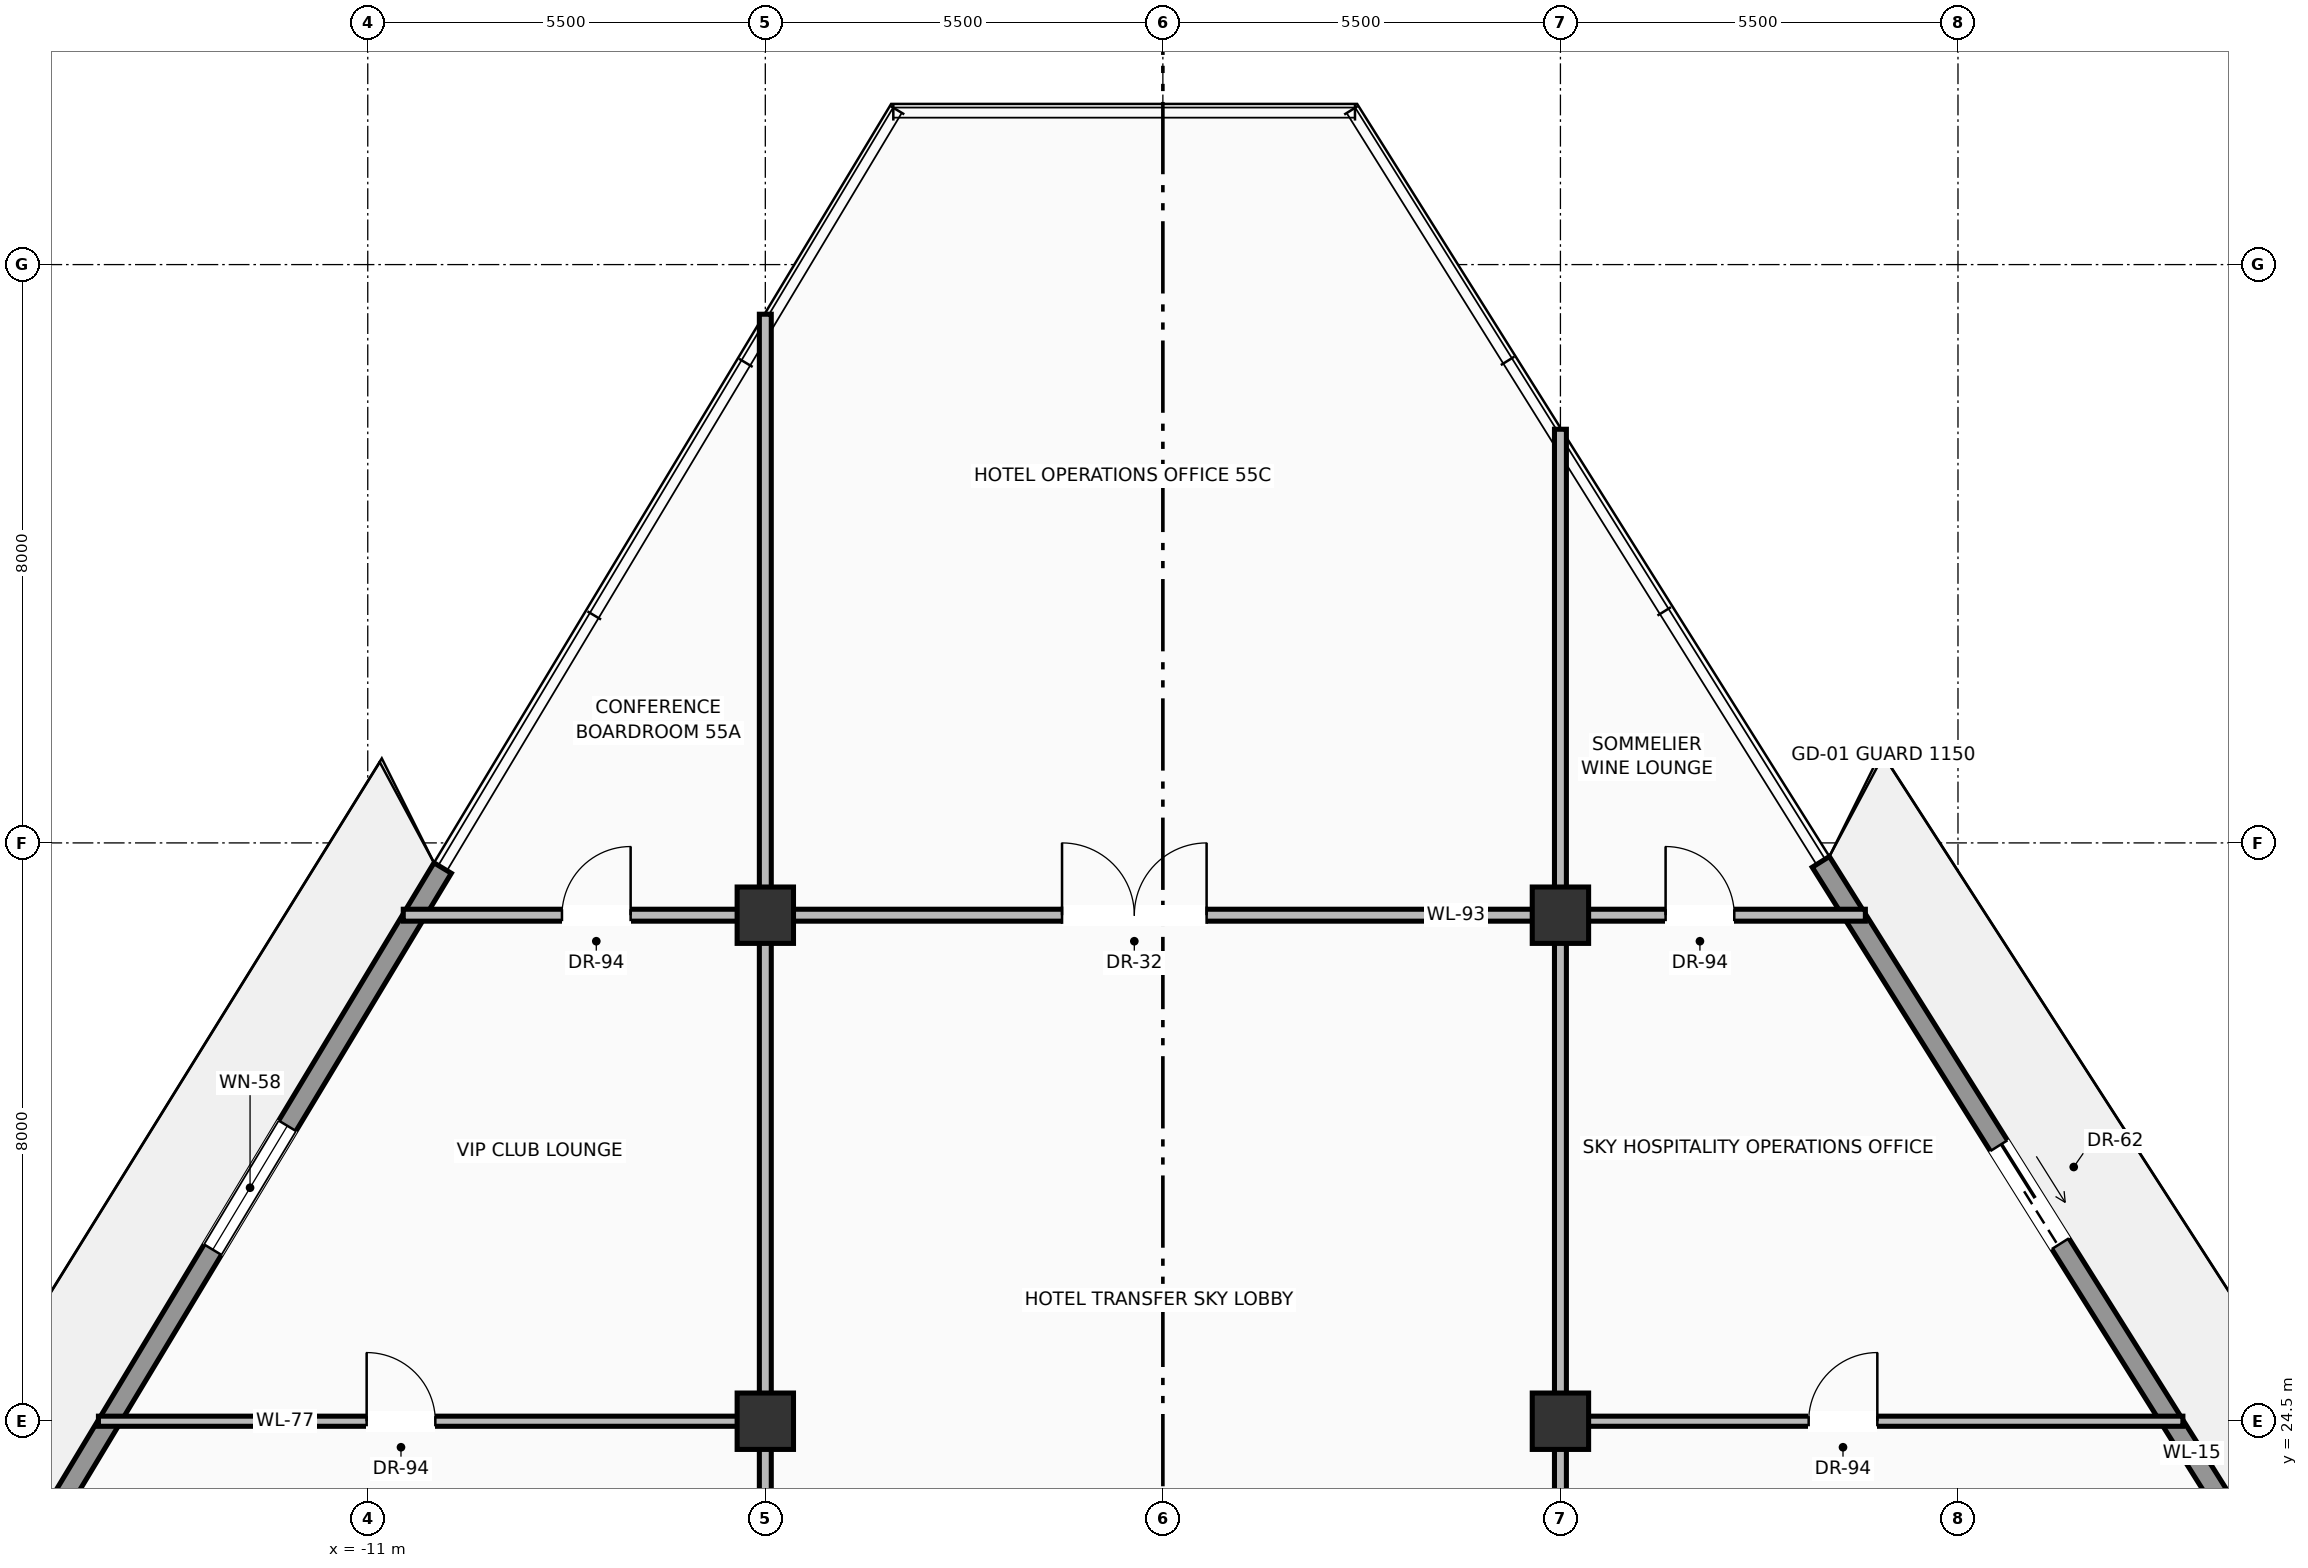
"""IFC4 building model, lengths in metres.
Left out: names, types, materials, properties, quantities, classifications, styles, units other than length and angle.
Written with IfcOpenShell. Run it as: python <this file> out.ifc"""

import sys

from ifc_helpers import new_model, si_unit, direction, frame, frame_2d, origin, origin_2d, place, context, subcontext, project, spatial, rectangle, extrude, source, transform, mapped, element, fill, save


model = new_model("IFC4")
c1 = context("Model", 3, precision=1e-05, world=origin(), true_north=direction((0.0, 1.0)))
c2 = subcontext(c1, "Body", "Model", "MODEL_VIEW")
j1 = project(units=[si_unit("LENGTHUNIT", "METRE"), si_unit("PLANEANGLEUNIT", "RADIAN")], contexts=[c1])
p1 = place(None, origin())
s1 = spatial("IfcSite", under=j1, at=p1, CompositionType="ELEMENT")
p2 = place(p1, origin())
s2 = spatial("IfcBuilding", under=s1, at=p2, CompositionType="ELEMENT")
p3 = place(p2, frame((0.0, 0.0, 215.4)))
s3 = spatial("IfcBuildingStorey", under=s2, at=p3, CompositionType="ELEMENT", Elevation=215.4)
m1 = source(origin(), c2, "Body", "SweptSolid", [
    extrude(rectangle(XDim=0.78, YDim=0.78, at=origin_2d()), origin(), (0.0, 0.0, 1.0), 4.6),
])
for number, where, z_axis, x_axis in (
    (1, (-5.5, 24.5, 0.0), (0.0, 0.0, 1.0), (1.0, 0.0, 0.0)),
    (2, (5.5, 24.5, 0.0), (0.0, 0.0, 1.0), (1.0, 0.0, 0.0)),
    (3, (-5.5, 31.5, 0.0), (0.0, 0.0, 1.0), (1.0, 0.0, 0.0)),
    (4, (5.5, 31.5, 0.0), (0.0, 0.0, 1.0), (1.0, 0.0, 0.0)),
):
    element("IfcColumn", number, at=place(p3, frame(where, z_axis=z_axis, x_axis=x_axis)), inside=s3, PredefinedType="COLUMN", context=c2, shape_type="MappedRepresentation", body=[
        mapped(m1, transform((0.0, 0.0, 0.0), scale=1.0)),
    ])
p4 = place(p3, frame((-19.903, 15.656, 0.0), z_axis=(0.0, 0.0, 1.0), x_axis=(0.516051519047, 0.856557546047, 0.0)))
e5 = element("IfcWall", 5, at=p4, inside=s3, PredefinedType="SOLIDWALL", context=c2, shape_type="SweptSolid", body=[
    extrude(rectangle(XDim=19.259, YDim=0.28, at=frame_2d((9.63, 0.0))), origin(), (0.0, 0.0, 1.0), 3.97),
])
p5 = place(p4, frame((4.622, 0.0, 0.0)))
e6 = element("IfcOpeningElement", 6, at=p5, cuts=e5, PredefinedType="OPENING", context=c2, shape_type="SweptSolid", body=[
    extrude(rectangle(XDim=1.6, YDim=2.35, at=frame_2d((0.8, 1.175))), frame((0.0, 0.15, 0.0), z_axis=(0.0, -1.0, 0.0), x_axis=(1.0, 0.0, 0.0)), (0.0, 0.0, 1.0), 0.3),
])
p6 = place(p4, frame((13.096, 0.0, 0.9)))
e7 = element("IfcOpeningElement", 7, at=p6, cuts=e5, PredefinedType="OPENING", context=c2, shape_type="SweptSolid", body=[
    extrude(rectangle(XDim=2.0, YDim=1.55, at=frame_2d((1.0, 0.775))), frame((0.0, 0.15, 0.0), z_axis=(0.0, -1.0, 0.0), x_axis=(1.0, 0.0, 0.0)), (0.0, 0.0, 1.0), 0.3),
])
p7 = place(p3, frame((9.102, 32.238, 0.0), z_axis=(0.0, 0.0, 1.0), x_axis=(0.531549047002, -0.847027514684, 0.0)))
e8 = element("IfcWall", 8, at=p7, inside=s3, PredefinedType="SOLIDWALL", context=c2, shape_type="SweptSolid", body=[
    extrude(rectangle(XDim=19.313, YDim=0.28, at=frame_2d((9.657, 0.0))), origin(), (0.0, 0.0, 1.0), 3.97),
])
p8 = place(p7, frame((4.635, 0.0, 0.0)))
e9 = element("IfcOpeningElement", 9, at=p8, cuts=e8, PredefinedType="OPENING", context=c2, shape_type="SweptSolid", body=[
    extrude(rectangle(XDim=1.6, YDim=2.35, at=frame_2d((0.8, 1.175))), frame((0.0, 0.15, 0.0), z_axis=(0.0, -1.0, 0.0), x_axis=(1.0, 0.0, 0.0)), (0.0, 0.0, 1.0), 0.3),
])
p9 = place(p7, frame((13.133, 0.0, 0.9)))
e10 = element("IfcOpeningElement", 10, at=p9, cuts=e8, PredefinedType="OPENING", context=c2, shape_type="SweptSolid", body=[
    extrude(rectangle(XDim=2.0, YDim=1.55, at=frame_2d((1.0, 0.775))), frame((0.0, 0.15, 0.0), z_axis=(0.0, -1.0, 0.0), x_axis=(1.0, 0.0, 0.0)), (0.0, 0.0, 1.0), 0.3),
])
p10 = place(p3, frame((-10.509, 31.5, 0.0), z_axis=(0.0, 0.0, 1.0), x_axis=(1.0, 0.0, 0.0)))
e11 = element("IfcWall", 11, at=p10, inside=s3, PredefinedType="PARTITIONING", context=c2, shape_type="SweptSolid", body=[
    extrude(rectangle(XDim=20.228, YDim=0.165, at=frame_2d((10.114, 0.0))), origin(), (0.0, 0.0, 1.0), 3.833),
])
p11 = place(p10, frame((9.114, 0.0, 0.0)))
e12 = element("IfcOpeningElement", 12, at=p11, cuts=e11, PredefinedType="OPENING", context=c2, shape_type="SweptSolid", body=[
    extrude(rectangle(XDim=2.0, YDim=2.4, at=frame_2d((1.0, 1.2))), frame((0.0, 0.093, 0.0), z_axis=(0.0, -1.0, 0.0), x_axis=(1.0, 0.0, 0.0)), (0.0, 0.0, 1.0), 0.185),
])
p12 = place(p10, frame((17.464, 0.0, 0.0)))
e13 = element("IfcOpeningElement", 13, at=p12, cuts=e11, PredefinedType="OPENING", context=c2, shape_type="SweptSolid", body=[
    extrude(rectangle(XDim=0.95, YDim=2.2, at=frame_2d((0.475, 1.1))), frame((0.0, 0.093, 0.0), z_axis=(0.0, -1.0, 0.0), x_axis=(1.0, 0.0, 0.0)), (0.0, 0.0, 1.0), 0.185),
])
p13 = place(p10, frame((2.195, 0.0, 0.0)))
e14 = element("IfcOpeningElement", 14, at=p13, cuts=e11, PredefinedType="OPENING", context=c2, shape_type="SweptSolid", body=[
    extrude(rectangle(XDim=0.95, YDim=2.2, at=frame_2d((0.475, 1.1))), frame((0.0, 0.093, 0.0), z_axis=(0.0, -1.0, 0.0), x_axis=(1.0, 0.0, 0.0)), (0.0, 0.0, 1.0), 0.185),
])
p14 = place(p3, frame((-5.5, 16.32, 0.0), z_axis=(0.0, 0.0, 1.0), x_axis=(0.0, 1.0, 0.0)))
e15 = element("IfcWall", 15, at=p14, inside=s3, PredefinedType="PARTITIONING", context=c2, shape_type="SweptSolid", body=[
    extrude(rectangle(XDim=23.493, YDim=0.165, at=frame_2d((11.747, 0.0))), origin(), (0.0, 0.0, 1.0), 3.833),
])
p15 = place(p14, frame((5.293, 0.0, 0.0)))
e16 = element("IfcOpeningElement", 16, at=p15, cuts=e15, PredefinedType="OPENING", context=c2, shape_type="SweptSolid", body=[
    extrude(rectangle(XDim=1.5, YDim=2.25, at=frame_2d((0.75, 1.125))), frame((0.0, 0.093, 0.0), z_axis=(0.0, -1.0, 0.0), x_axis=(1.0, 0.0, 0.0)), (0.0, 0.0, 1.0), 0.185),
])
p16 = place(p3, frame((5.5, 16.32, 0.0), z_axis=(0.0, 0.0, 1.0), x_axis=(0.0, 1.0, 0.0)))
e17 = element("IfcWall", 17, at=p16, inside=s3, PredefinedType="PARTITIONING", context=c2, shape_type="SweptSolid", body=[
    extrude(rectangle(XDim=21.902, YDim=0.165, at=frame_2d((10.951, 0.0))), origin(), (0.0, 0.0, 1.0), 3.833),
])
p17 = place(p16, frame((4.896, 0.0, 0.0)))
e18 = element("IfcOpeningElement", 18, at=p17, cuts=e17, PredefinedType="OPENING", context=c2, shape_type="SweptSolid", body=[
    extrude(rectangle(XDim=1.5, YDim=2.25, at=frame_2d((0.75, 1.125))), frame((0.0, 0.093, 0.0), z_axis=(0.0, -1.0, 0.0), x_axis=(1.0, 0.0, 0.0)), (0.0, 0.0, 1.0), 0.185),
])
p18 = place(p3, frame((-14.726, 24.5, 0.0), z_axis=(0.0, 0.0, 1.0), x_axis=(1.0, 0.0, 0.0)))
e19 = element("IfcWall", 19, at=p18, inside=s3, PredefinedType="PARTITIONING", context=c2, shape_type="SweptSolid", body=[
    extrude(rectangle(XDim=9.226, YDim=0.14, at=frame_2d((4.613, 0.0))), origin(), (0.0, 0.0, 1.0), 3.833),
])
p19 = place(p18, frame((3.711, 0.0, 0.0)))
e20 = element("IfcOpeningElement", 20, at=p19, cuts=e19, PredefinedType="OPENING", context=c2, shape_type="SweptSolid", body=[
    extrude(rectangle(XDim=0.95, YDim=2.2, at=frame_2d((0.475, 1.1))), frame((0.0, 0.08, 0.0), z_axis=(0.0, -1.0, 0.0), x_axis=(1.0, 0.0, 0.0)), (0.0, 0.0, 1.0), 0.16),
])
p20 = place(p3, frame((5.5, 24.5, 0.0), z_axis=(0.0, 0.0, 1.0), x_axis=(1.0, 0.0, 0.0)))
e21 = element("IfcWall", 21, at=p20, inside=s3, PredefinedType="PARTITIONING", context=c2, shape_type="SweptSolid", body=[
    extrude(rectangle(XDim=8.612, YDim=0.14, at=frame_2d((4.306, 0.0))), origin(), (0.0, 0.0, 1.0), 3.833),
])
p21 = place(p20, frame((3.434, 0.0, 0.0)))
e22 = element("IfcOpeningElement", 22, at=p21, cuts=e21, PredefinedType="OPENING", context=c2, shape_type="SweptSolid", body=[
    extrude(rectangle(XDim=0.95, YDim=2.2, at=frame_2d((0.475, 1.1))), frame((0.0, 0.08, 0.0), z_axis=(0.0, -1.0, 0.0), x_axis=(1.0, 0.0, 0.0)), (0.0, 0.0, 1.0), 0.16),
])
m2 = source(origin(), c2, "Body", "SweptSolid", [
    extrude(rectangle(XDim=2.0, YDim=1.55, at=frame_2d((1.0, 0.775))), frame((0.0, 0.03, 0.0), z_axis=(0.0, -1.0, 0.0), x_axis=(1.0, 0.0, 0.0)), (0.0, 0.0, 1.0), 0.06),
])
p22 = place(p6, origin())
e23 = element("IfcWindow", 23, at=p22, inside=s3, PartitioningType="SINGLE_PANEL", PredefinedType="WINDOW", context=c2, shape_type="MappedRepresentation", body=[
    mapped(m2, transform((0.0, 0.0, 0.0), scale=1.0)),
])
fill(e7, e23)
m3 = source(origin(), c2, "Body", "SweptSolid", [
    extrude(rectangle(XDim=1.6, YDim=2.35, at=frame_2d((0.8, 1.175))), frame((0.0, 0.025, 0.0), z_axis=(0.0, -1.0, 0.0), x_axis=(1.0, 0.0, 0.0)), (0.0, 0.0, 1.0), 0.05),
])
p23 = place(p8, origin())
e24 = element("IfcDoor", 24, at=p23, inside=s3, OperationType="SLIDING_TO_RIGHT", PredefinedType="DOOR", context=c2, shape_type="MappedRepresentation", body=[
    mapped(m3, transform((0.0, 0.0, 0.0), scale=1.0)),
])
fill(e9, e24)
m4 = source(origin(), c2, "Body", "SweptSolid", [
    extrude(rectangle(XDim=2.0, YDim=2.4, at=frame_2d((1.0, 1.2))), frame((0.0, 0.025, 0.0), z_axis=(0.0, -1.0, 0.0), x_axis=(1.0, 0.0, 0.0)), (0.0, 0.0, 1.0), 0.05),
])
p24 = place(p11, origin())
e25 = element("IfcDoor", 25, at=p24, inside=s3, OperationType="DOUBLE_DOOR_SINGLE_SWING", PredefinedType="DOOR", context=c2, shape_type="MappedRepresentation", body=[
    mapped(m4, transform((0.0, 0.0, 0.0), scale=1.0)),
])
fill(e12, e25)
m5 = source(origin(), c2, "Body", "SweptSolid", [
    extrude(rectangle(XDim=0.95, YDim=2.2, at=frame_2d((0.475, 1.1))), frame((0.0, 0.025, 0.0), z_axis=(0.0, -1.0, 0.0), x_axis=(1.0, 0.0, 0.0)), (0.0, 0.0, 1.0), 0.05),
])
p25 = place(p19, origin())
e26 = element("IfcDoor", 26, at=p25, inside=s3, OperationType="SINGLE_SWING_LEFT", PredefinedType="DOOR", context=c2, shape_type="MappedRepresentation", body=[
    mapped(m5, transform((0.0, 0.0, 0.0), scale=1.0)),
])
fill(e20, e26)
p26 = place(p21, origin())
e27 = element("IfcDoor", 27, at=p26, inside=s3, OperationType="SINGLE_SWING_RIGHT", PredefinedType="DOOR", context=c2, shape_type="MappedRepresentation", body=[
    mapped(m5, transform((0.0, 0.0, 0.0), scale=1.0)),
])
fill(e22, e27)
p27 = place(p12, origin())
e28 = element("IfcDoor", 28, at=p27, inside=s3, OperationType="SINGLE_SWING_LEFT", PredefinedType="DOOR", context=c2, shape_type="MappedRepresentation", body=[
    mapped(m5, transform((0.0, 0.0, 0.0), scale=1.0)),
])
fill(e13, e28)
p28 = place(p13, origin())
e29 = element("IfcDoor", 29, at=p28, inside=s3, OperationType="SINGLE_SWING_RIGHT", PredefinedType="DOOR", context=c2, shape_type="MappedRepresentation", body=[
    mapped(m5, transform((0.0, 0.0, 0.0), scale=1.0)),
])
fill(e14, e29)
save(model, sys.argv[1])
